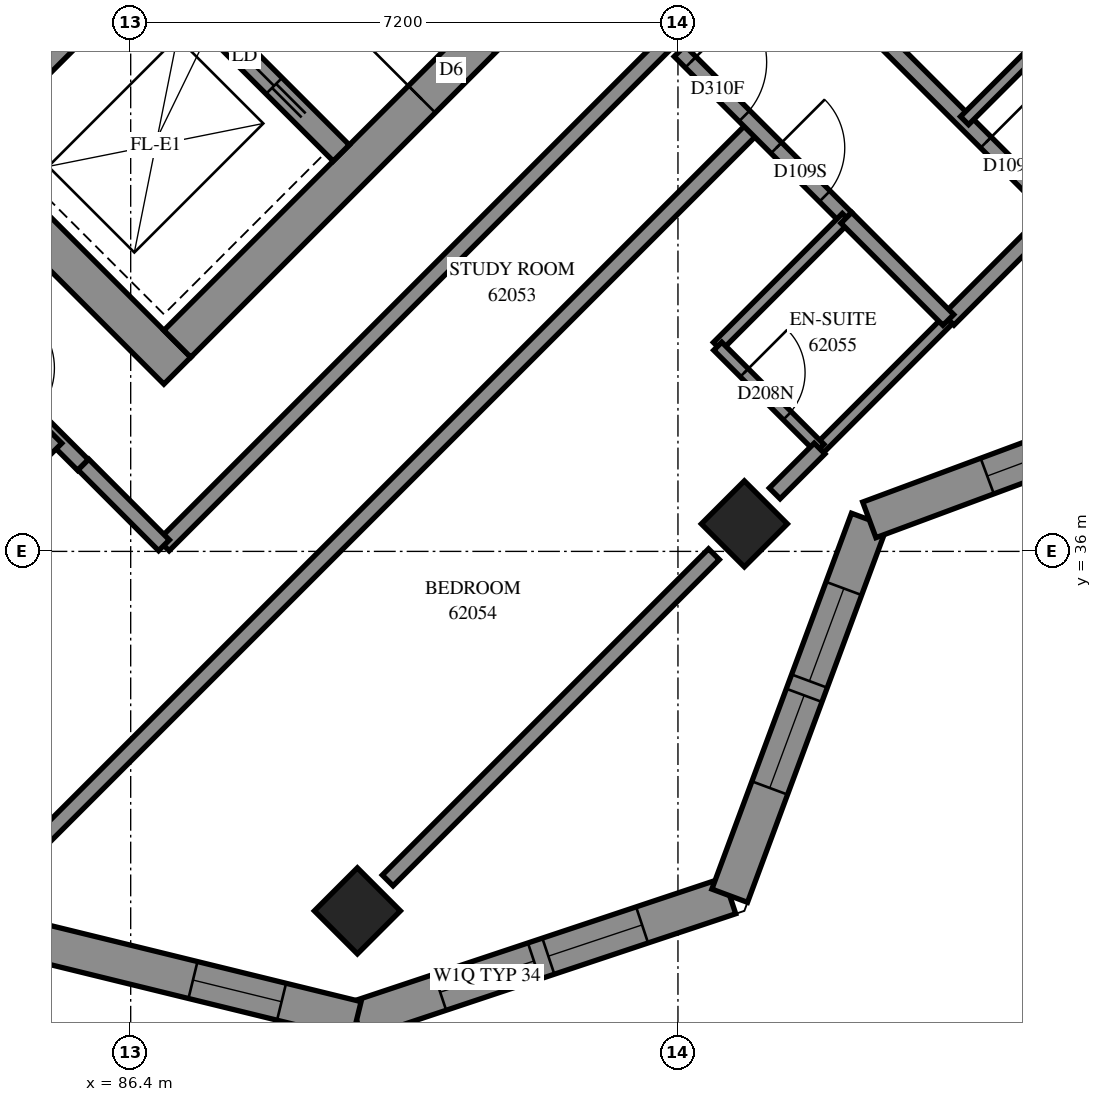
"""IFC4 building model, lengths in metres.
Left out: names, types, materials, properties, quantities, classifications, styles, units other than length and angle.
Written with IfcOpenShell. Run it as: python <this file> out.ifc"""

import sys

from ifc_helpers import new_model, si_unit, direction, frame, frame_2d, origin, origin_2d, place, context, subcontext, project, spatial, polyline, rectangle, outline, extrude, element, fill, save


model = new_model("IFC4")
c1 = context("Model", 3, precision=1e-05, world=origin(), true_north=direction((0.0, 1.0)))
c2 = subcontext(c1, "Body", "Model", "MODEL_VIEW")
j1 = project(units=[si_unit("LENGTHUNIT", "METRE"), si_unit("PLANEANGLEUNIT", "RADIAN")], contexts=[c1])
p1 = place(None, origin())
s1 = spatial("IfcSite", under=j1, at=p1, CompositionType="ELEMENT")
p2 = place(p1, origin())
s2 = spatial("IfcBuilding", under=s1, at=p2, CompositionType="ELEMENT")
p3 = place(p2, frame((0.0, 0.0, 227.0)))
s3 = spatial("IfcBuildingStorey", under=s2, at=p3, CompositionType="ELEMENT", Elevation=227.0)
for number, where, z_axis, x_axis in (
    (1, (94.474, 36.362, 0.0), (0.0, 0.0, 1.0), (0.707, -0.707, 0.0)),
    (2, (89.382, 31.271, 0.0), (0.0, 0.0, 1.0), (0.707, -0.707, 0.0)),
):
    element("IfcColumn", number, at=place(p3, frame(where, z_axis=z_axis, x_axis=x_axis)), inside=s3, PredefinedType="COLUMN", context=c2, shape_type="SweptSolid", body=[
        extrude(rectangle(XDim=0.8, YDim=0.8, at=origin_2d()), origin(), (0.0, 0.0, 1.0), 3.1),
    ])
p4 = place(p3, frame((76.124, 49.267, -0.3), z_axis=(0.0, 0.0, 1.0), x_axis=(0.7071067812, -0.7071067812, 0.0)))
e3 = element("IfcWall", 3, at=p4, inside=s3, PredefinedType="SHEAR", context=c2, shape_type="SweptSolid", body=[
    extrude(rectangle(XDim=15.4, YDim=0.5, at=frame_2d((7.7, 0.0))), origin(), (0.0, 0.0, 1.0), 2.7),
])
p5 = place(p3, frame((87.013, 38.731, -0.3), z_axis=(0.0, 0.0, 1.0), x_axis=(0.7071067812, 0.7071067812, 0.0)))
e4 = element("IfcWall", 4, at=p5, inside=s3, PredefinedType="SHEAR", context=c2, shape_type="SweptSolid", body=[
    extrude(rectangle(XDim=14.4, YDim=0.5, at=frame_2d((7.2, 0.0))), origin(), (0.0, 0.0, 1.0), 2.7),
])
p6 = place(p5, frame((4.55, 0.0, 0.3)))
e5 = element("IfcOpeningElement", 5, at=p6, cuts=e4, PredefinedType="OPENING", context=c2, shape_type="SweptSolid", body=[
    extrude(rectangle(XDim=1.1, YDim=2.1, at=frame_2d((0.55, 1.05))), frame((0.0, 0.26, 0.0), z_axis=(0.0, -1.0, 0.0), x_axis=(1.0, 0.0, 0.0)), (0.0, 0.0, 1.0), 0.52),
])
p7 = place(p5, frame((11.35, 0.0, 0.3)))
e6 = element("IfcOpeningElement", 6, at=p7, cuts=e4, PredefinedType="OPENING", context=c2, shape_type="SweptSolid", body=[
    extrude(rectangle(XDim=1.1, YDim=2.1, at=frame_2d((0.55, 1.05))), frame((0.0, 0.26, 0.0), z_axis=(0.0, -1.0, 0.0), x_axis=(1.0, 0.0, 0.0)), (0.0, 0.0, 1.0), 0.52),
])
p8 = place(p3, frame((84.291, 41.453, 0.0), z_axis=(0.0, 0.0, 1.0), x_axis=(0.7071067812, 0.7071067812, 0.0)))
e7 = element("IfcWall", 7, at=p8, inside=s3, PredefinedType="SOLIDWALL", context=c2, shape_type="SweptSolid", body=[
    extrude(rectangle(XDim=3.3, YDim=0.3, at=frame_2d((1.65, 0.0))), origin(), (0.0, 0.0, 1.0), 3.1),
])
p9 = place(p3, frame((78.988, 51.423, 0.0), z_axis=(0.0, 0.0, 1.0), x_axis=(0.7071067812, -0.7071067812, 0.0)))
e8 = element("IfcWall", 8, at=p9, inside=s3, PredefinedType="SOLIDWALL", context=c2, shape_type="SweptSolid", body=[
    extrude(rectangle(XDim=14.4, YDim=0.3, at=frame_2d((7.2, 0.0))), origin(), (0.0, 0.0, 1.0), 3.1),
])
p10 = place(p9, frame((1.35, 0.0, 0.0)))
e9 = element("IfcOpeningElement", 9, at=p10, cuts=e8, PredefinedType="OPENING", context=c2, shape_type="SweptSolid", body=[
    extrude(rectangle(XDim=0.9, YDim=2.1, at=frame_2d((0.45, 1.05))), frame((0.0, 0.16, 0.0), z_axis=(0.0, -1.0, 0.0), x_axis=(1.0, 0.0, 0.0)), (0.0, 0.0, 1.0), 0.32),
])
p11 = place(p9, frame((4.95, 0.0, 0.0)))
e10 = element("IfcOpeningElement", 10, at=p11, cuts=e8, PredefinedType="OPENING", context=c2, shape_type="SweptSolid", body=[
    extrude(rectangle(XDim=0.9, YDim=2.1, at=frame_2d((0.45, 1.05))), frame((0.0, 0.16, 0.0), z_axis=(0.0, -1.0, 0.0), x_axis=(1.0, 0.0, 0.0)), (0.0, 0.0, 1.0), 0.32),
])
p12 = place(p9, frame((8.55, 0.0, 0.0)))
e11 = element("IfcOpeningElement", 11, at=p12, cuts=e8, PredefinedType="OPENING", context=c2, shape_type="SweptSolid", body=[
    extrude(rectangle(XDim=0.9, YDim=2.1, at=frame_2d((0.45, 1.05))), frame((0.0, 0.16, 0.0), z_axis=(0.0, -1.0, 0.0), x_axis=(1.0, 0.0, 0.0)), (0.0, 0.0, 1.0), 0.32),
])
p13 = place(p9, frame((12.05, 0.0, 0.0)))
e12 = element("IfcOpeningElement", 12, at=p13, cuts=e8, PredefinedType="OPENING", context=c2, shape_type="SweptSolid", body=[
    extrude(rectangle(XDim=1.1, YDim=2.1, at=frame_2d((0.55, 1.05))), frame((0.0, 0.16, 0.0), z_axis=(0.0, -1.0, 0.0), x_axis=(1.0, 0.0, 0.0)), (0.0, 0.0, 1.0), 0.32),
])
p14 = place(p3, frame((89.372, 29.834, 0.0), z_axis=(0.0, 0.0, 1.0), x_axis=(0.948687163, 0.3162161709, 0.0)))
e13 = element("IfcWall", 13, at=p14, inside=s3, PredefinedType="SOLIDWALL", context=c2, shape_type="SweptSolid", body=[
    extrude(outline(polyline([(-0.072, -0.25), (5.294, -0.25), (5.055, 0.25), (0.072, 0.25), (-0.072, -0.25)])), origin(), (0.0, 0.0, 1.0), 3.1),
])
p15 = place(p14, frame((1.16, 0.0, 0.45)))
e14 = element("IfcOpeningElement", 14, at=p15, cuts=e13, PredefinedType="OPENING", context=c2, shape_type="SweptSolid", body=[
    extrude(rectangle(XDim=1.3, YDim=2.5, at=frame_2d((0.65, 1.25))), frame((0.0, 0.26, 0.0), z_axis=(0.0, -1.0, 0.0), x_axis=(1.0, 0.0, 0.0)), (0.0, 0.0, 1.0), 0.52),
])
p16 = place(p14, frame((2.66, 0.0, 0.45)))
e15 = element("IfcOpeningElement", 15, at=p16, cuts=e13, PredefinedType="OPENING", context=c2, shape_type="SweptSolid", body=[
    extrude(rectangle(XDim=1.3, YDim=2.5, at=frame_2d((0.65, 1.25))), frame((0.0, 0.26, 0.0), z_axis=(0.0, -1.0, 0.0), x_axis=(1.0, 0.0, 0.0)), (0.0, 0.0, 1.0), 0.52),
])
p17 = place(p3, frame((94.281, 31.47, 0.0), z_axis=(0.0, 0.0, 1.0), x_axis=(0.3481903374, 0.9374238577, 0.0)))
e16 = element("IfcWall", 16, at=p17, inside=s3, PredefinedType="SOLIDWALL", context=c2, shape_type="SweptSolid", body=[
    extrude(outline(polyline([(-0.12, -0.25), (5.16, -0.25), (5.39, 0.25), (0.12, 0.25), (-0.12, -0.25)])), origin(), (0.0, 0.0, 1.0), 3.1),
])
p18 = place(p17, frame((1.512, 0.0, 0.45)))
e17 = element("IfcOpeningElement", 17, at=p18, cuts=e16, PredefinedType="OPENING", context=c2, shape_type="SweptSolid", body=[
    extrude(rectangle(XDim=1.3, YDim=2.5, at=frame_2d((0.65, 1.25))), frame((0.0, 0.26, 0.0), z_axis=(0.0, -1.0, 0.0), x_axis=(1.0, 0.0, 0.0)), (0.0, 0.0, 1.0), 0.52),
])
p19 = place(p17, frame((3.012, 0.0, 0.45)))
e18 = element("IfcOpeningElement", 18, at=p19, cuts=e16, PredefinedType="OPENING", context=c2, shape_type="SweptSolid", body=[
    extrude(rectangle(XDim=1.3, YDim=2.5, at=frame_2d((0.65, 1.25))), frame((0.0, 0.26, 0.0), z_axis=(0.0, -1.0, 0.0), x_axis=(1.0, 0.0, 0.0)), (0.0, 0.0, 1.0), 0.52),
])
p20 = place(p3, frame((96.118, 36.415, 0.0), z_axis=(0.0, 0.0, 1.0), x_axis=(0.9374238577, 0.3481903374, 0.0)))
e19 = element("IfcWall", 19, at=p20, inside=s3, PredefinedType="SOLIDWALL", context=c2, shape_type="SweptSolid", body=[
    extrude(outline(polyline([(0.115, -0.25), (5.395, -0.25), (5.155, 0.25), (-0.115, 0.25), (0.115, -0.25)])), origin(), (0.0, 0.0, 1.0), 3.1),
])
p21 = place(p20, frame((1.655, 0.0, 0.45)))
e20 = element("IfcOpeningElement", 20, at=p21, cuts=e19, PredefinedType="OPENING", context=c2, shape_type="SweptSolid", body=[
    extrude(rectangle(XDim=1.3, YDim=2.5, at=frame_2d((0.65, 1.25))), frame((0.0, 0.26, 0.0), z_axis=(0.0, -1.0, 0.0), x_axis=(1.0, 0.0, 0.0)), (0.0, 0.0, 1.0), 0.52),
])
p22 = place(p20, frame((3.155, 0.0, 0.45)))
e21 = element("IfcOpeningElement", 21, at=p22, cuts=e19, PredefinedType="OPENING", context=c2, shape_type="SweptSolid", body=[
    extrude(rectangle(XDim=1.3, YDim=2.5, at=frame_2d((0.65, 1.25))), frame((0.0, 0.26, 0.0), z_axis=(0.0, -1.0, 0.0), x_axis=(1.0, 0.0, 0.0)), (0.0, 0.0, 1.0), 0.52),
])
p23 = place(p3, frame((85.087, 30.883, 0.0), z_axis=(0.0, 0.0, 1.0), x_axis=(0.9712772119, -0.2379507881, 0.0)))
e22 = element("IfcWall", 22, at=p23, inside=s3, PredefinedType="SOLIDWALL", context=c2, shape_type="SweptSolid", body=[
    extrude(outline(polyline([(-0.145, -0.25), (4.483, -0.25), (4.339, 0.25), (0.145, 0.25), (-0.145, -0.25)])), origin(), (0.0, 0.0, 1.0), 3.1),
])
p24 = place(p23, frame((2.195, 0.0, 0.45)))
e23 = element("IfcOpeningElement", 23, at=p24, cuts=e22, PredefinedType="OPENING", context=c2, shape_type="SweptSolid", body=[
    extrude(rectangle(XDim=1.2, YDim=2.5, at=frame_2d((0.6, 1.25))), frame((0.0, 0.26, 0.0), z_axis=(0.0, -1.0, 0.0), x_axis=(1.0, 0.0, 0.0)), (0.0, 0.0, 1.0), 0.52),
])
p25 = place(p3, frame((85.026, 32.008, 0.0), z_axis=(0.0, 0.0, 1.0), x_axis=(0.7071030933, 0.707110469, 0.0)))
e24 = element("IfcWall", 24, at=p25, inside=s3, PredefinedType="PARTITIONING", context=c2, shape_type="SweptSolid", body=[
    extrude(rectangle(XDim=13.558, YDim=0.2, at=frame_2d((6.779, 0.0))), origin(), (0.0, 0.0, 1.0), 3.1),
])
p26 = place(p3, frame((86.835, 36.079, 0.0), z_axis=(0.0, 0.0, 1.0), x_axis=(0.7071067812, 0.7071067812, 0.0)))
e25 = element("IfcWall", 25, at=p26, inside=s3, PredefinedType="PARTITIONING", context=c2, shape_type="SweptSolid", body=[
    extrude(rectangle(XDim=9.402, YDim=0.2, at=frame_2d((4.701, 0.0))), origin(), (0.0, 0.0, 1.0), 3.1),
])
p27 = place(p3, frame((80.849, 42.061, 0.0), z_axis=(0.0, 0.0, 1.0), x_axis=(0.7071067812, -0.7071067812, 0.0)))
e26 = element("IfcWall", 26, at=p27, inside=s3, PredefinedType="PARTITIONING", context=c2, shape_type="SweptSolid", body=[
    extrude(rectangle(XDim=6.964, YDim=0.2, at=frame_2d((3.482, 0.0))), origin(), (0.0, 0.0, 1.0), 3.1),
])
p28 = place(p27, frame((5.159, 0.0, 0.0)))
e27 = element("IfcOpeningElement", 27, at=p28, cuts=e26, PredefinedType="OPENING", context=c2, shape_type="SweptSolid", body=[
    extrude(rectangle(XDim=0.9, YDim=2.1, at=frame_2d((0.45, 1.05))), frame((0.0, 0.11, 0.0), z_axis=(0.0, -1.0, 0.0), x_axis=(1.0, 0.0, 0.0)), (0.0, 0.0, 1.0), 0.22),
])
p29 = place(p3, frame((89.781, 31.671, 0.0), z_axis=(0.0, 0.0, 1.0), x_axis=(0.7071067812, 0.7071067812, 0.0)))
e28 = element("IfcWall", 28, at=p29, inside=s3, PredefinedType="PARTITIONING", context=c2, shape_type="SweptSolid", body=[
    extrude(rectangle(XDim=6.07, YDim=0.2, at=frame_2d((3.035, 0.0))), origin(), (0.0, 0.0, 1.0), 2.6),
])
p30 = place(p3, frame((94.895, 44.137, 0.0), z_axis=(0.0, 0.0, 1.0), x_axis=(0.7071067812, -0.7071067812, 0.0)))
e29 = element("IfcWall", 29, at=p30, inside=s3, PredefinedType="PARTITIONING", context=c2, shape_type="SweptSolid", body=[
    extrude(rectangle(XDim=5.199, YDim=0.2, at=frame_2d((2.599, 0.0))), origin(), (0.0, 0.0, 1.0), 3.1),
])
p31 = place(p30, frame((3.898, 0.0, 0.0)))
e30 = element("IfcOpeningElement", 30, at=p31, cuts=e29, PredefinedType="OPENING", context=c2, shape_type="SweptSolid", body=[
    extrude(rectangle(XDim=0.9, YDim=2.1, at=frame_2d((0.45, 1.05))), frame((0.0, 0.11, 0.0), z_axis=(0.0, -1.0, 0.0), x_axis=(1.0, 0.0, 0.0)), (0.0, 0.0, 1.0), 0.22),
])
p32 = place(p3, frame((93.621, 42.581, 0.0), z_axis=(0.0, 0.0, 1.0), x_axis=(0.7071067812, -0.7071067812, 0.0)))
e31 = element("IfcWall", 31, at=p32, inside=s3, PredefinedType="PARTITIONING", context=c2, shape_type="SweptSolid", body=[
    extrude(rectangle(XDim=3.1, YDim=0.2, at=frame_2d((1.55, 0.0))), origin(), (0.0, 0.0, 1.0), 3.1),
])
p33 = place(p32, frame((0.206, 0.0, 0.0)))
e32 = element("IfcOpeningElement", 32, at=p33, cuts=e31, PredefinedType="OPENING", context=c2, shape_type="SweptSolid", body=[
    extrude(rectangle(XDim=1.0, YDim=2.1, at=frame_2d((0.5, 1.05))), frame((0.0, 0.11, 0.0), z_axis=(0.0, -1.0, 0.0), x_axis=(1.0, 0.0, 0.0)), (0.0, 0.0, 1.0), 0.22),
])
p34 = place(p32, frame((1.8, 0.0, 0.0)))
e33 = element("IfcOpeningElement", 33, at=p34, cuts=e31, PredefinedType="OPENING", context=c2, shape_type="SweptSolid", body=[
    extrude(rectangle(XDim=0.9, YDim=2.1, at=frame_2d((0.45, 1.05))), frame((0.0, 0.11, 0.0), z_axis=(0.0, -1.0, 0.0), x_axis=(1.0, 0.0, 0.0)), (0.0, 0.0, 1.0), 0.22),
])
p35 = place(p3, frame((97.371, 41.667, 0.0), z_axis=(0.0, 0.0, 1.0), x_axis=(0.7075233388, 0.706689978, 0.0)))
e34 = element("IfcWall", 34, at=p35, inside=s3, PredefinedType="PARTITIONING", context=c2, shape_type="SweptSolid", body=[
    extrude(rectangle(XDim=2.4, YDim=0.15, at=frame_2d((1.2, 0.0))), origin(), (0.0, 0.0, 1.0), 3.1),
])
p36 = place(p3, frame((94.12, 38.697, 0.0), z_axis=(0.0, 0.0, 1.0), x_axis=(0.7071067812, 0.7071067812, 0.0)))
e35 = element("IfcWall", 35, at=p36, inside=s3, PredefinedType="PARTITIONING", context=c2, shape_type="SweptSolid", body=[
    extrude(rectangle(XDim=2.398, YDim=0.15, at=frame_2d((1.199, 0.0))), origin(), (0.0, 0.0, 1.0), 3.1),
])
p37 = place(p3, frame((95.463, 37.353, 0.0), z_axis=(0.0, 0.0, 1.0), x_axis=(0.7071067812, 0.7071067812, 0.0)))
e36 = element("IfcWall", 36, at=p37, inside=s3, PredefinedType="PARTITIONING", context=c2, shape_type="SweptSolid", body=[
    extrude(rectangle(XDim=2.398, YDim=0.15, at=frame_2d((1.199, 0.0))), origin(), (0.0, 0.0, 1.0), 2.6),
])
p38 = place(p3, frame((97.16, 39.048, 0.0), z_axis=(0.0, 0.0, 1.0), x_axis=(0.7066068826, 0.7076063266, 0.0)))
e37 = element("IfcWall", 37, at=p38, inside=s3, PredefinedType="PARTITIONING", context=c2, shape_type="SweptSolid", body=[
    extrude(rectangle(XDim=2.001, YDim=0.2, at=frame_2d((1.001, 0.0))), origin(), (0.0, 0.0, 1.0), 2.6),
])
p39 = place(p3, frame((94.124, 38.7, 0.0), z_axis=(0.0, 0.0, 1.0), x_axis=(0.7071067812, -0.7071067812, 0.0)))
e38 = element("IfcWall", 38, at=p39, inside=s3, PredefinedType="PARTITIONING", context=c2, shape_type="SweptSolid", body=[
    extrude(rectangle(XDim=1.901, YDim=0.15, at=frame_2d((0.95, 0.0))), origin(), (0.0, 0.0, 1.0), 3.1),
])
p40 = place(p39, frame((0.494, 0.0, 0.0)))
e39 = element("IfcOpeningElement", 39, at=p40, cuts=e38, PredefinedType="OPENING", context=c2, shape_type="SweptSolid", body=[
    extrude(rectangle(XDim=0.8, YDim=2.1, at=frame_2d((0.4, 1.05))), frame((0.0, 0.085, 0.0), z_axis=(0.0, -1.0, 0.0), x_axis=(1.0, 0.0, 0.0)), (0.0, 0.0, 1.0), 0.17),
])
p41 = place(p3, frame((95.815, 40.389, 0.0), z_axis=(0.0, 0.0, 1.0), x_axis=(0.7065800724, -0.7076330979, 0.0)))
e40 = element("IfcWall", 40, at=p41, inside=s3, PredefinedType="PARTITIONING", context=c2, shape_type="SweptSolid", body=[
    extrude(rectangle(XDim=1.899, YDim=0.2, at=frame_2d((0.95, 0.0))), origin(), (0.0, 0.0, 1.0), 3.1),
])
p42 = place(p3, frame((85.778, 37.142, 0.0), z_axis=(0.0, 0.0, 1.0), x_axis=(0.7064400143, -0.70777292, 0.0)))
e41 = element("IfcWall", 41, at=p42, inside=s3, PredefinedType="PARTITIONING", context=c2, shape_type="SweptSolid", body=[
    extrude(rectangle(XDim=1.5, YDim=0.2, at=frame_2d((0.75, 0.0))), origin(), (0.0, 0.0, 1.0), 3.1),
])
p43 = place(p3, frame((84.693, 36.761, 0.0), z_axis=(0.0, 0.0, 1.0), x_axis=(0.7061388061, 0.708073433, 0.0)))
e42 = element("IfcWall", 42, at=p43, inside=s3, PredefinedType="PARTITIONING", context=c2, shape_type="SweptSolid", body=[
    extrude(rectangle(XDim=1.034, YDim=0.2, at=frame_2d((0.517, 0.0))), origin(), (0.0, 0.0, 1.0), 3.1),
])
p44 = place(p3, frame((94.873, 36.763, 0.0), z_axis=(0.0, 0.0, 1.0), x_axis=(0.7071067812, 0.7071067812, 0.0)))
e43 = element("IfcWall", 43, at=p44, inside=s3, PredefinedType="PARTITIONING", context=c2, shape_type="SweptSolid", body=[
    extrude(rectangle(XDim=0.834, YDim=0.2, at=frame_2d((0.417, 0.0))), origin(), (0.0, 0.0, 1.0), 2.6),
])
p45 = place(p15, origin())
e44 = element("IfcWindow", 44, at=p45, inside=s3, PartitioningType="SINGLE_PANEL", PredefinedType="WINDOW", context=c2, shape_type="SweptSolid", body=[
    extrude(rectangle(XDim=1.3, YDim=2.5, at=frame_2d((0.65, 1.25))), frame((0.0, 0.18, 0.0), z_axis=(0.0, -1.0, 0.0), x_axis=(1.0, 0.0, 0.0)), (0.0, 0.0, 1.0), 0.06),
])
fill(e14, e44)
p46 = place(p16, origin())
e45 = element("IfcWindow", 45, at=p46, inside=s3, PartitioningType="SINGLE_PANEL", PredefinedType="WINDOW", context=c2, shape_type="SweptSolid", body=[
    extrude(rectangle(XDim=1.3, YDim=2.5, at=frame_2d((0.65, 1.25))), frame((0.0, 0.18, 0.0), z_axis=(0.0, -1.0, 0.0), x_axis=(1.0, 0.0, 0.0)), (0.0, 0.0, 1.0), 0.06),
])
fill(e15, e45)
p47 = place(p18, origin())
e46 = element("IfcWindow", 46, at=p47, inside=s3, PartitioningType="SINGLE_PANEL", PredefinedType="WINDOW", context=c2, shape_type="SweptSolid", body=[
    extrude(rectangle(XDim=1.3, YDim=2.5, at=frame_2d((0.65, 1.25))), frame((0.0, 0.18, 0.0), z_axis=(0.0, -1.0, 0.0), x_axis=(1.0, 0.0, 0.0)), (0.0, 0.0, 1.0), 0.06),
])
fill(e17, e46)
p48 = place(p19, origin())
e47 = element("IfcWindow", 47, at=p48, inside=s3, PartitioningType="SINGLE_PANEL", PredefinedType="WINDOW", context=c2, shape_type="SweptSolid", body=[
    extrude(rectangle(XDim=1.3, YDim=2.5, at=frame_2d((0.65, 1.25))), frame((0.0, 0.18, 0.0), z_axis=(0.0, -1.0, 0.0), x_axis=(1.0, 0.0, 0.0)), (0.0, 0.0, 1.0), 0.06),
])
fill(e18, e47)
p49 = place(p21, origin())
e48 = element("IfcWindow", 48, at=p49, inside=s3, PartitioningType="SINGLE_PANEL", PredefinedType="WINDOW", context=c2, shape_type="SweptSolid", body=[
    extrude(rectangle(XDim=1.3, YDim=2.5, at=frame_2d((0.65, 1.25))), frame((0.0, 0.18, 0.0), z_axis=(0.0, -1.0, 0.0), x_axis=(1.0, 0.0, 0.0)), (0.0, 0.0, 1.0), 0.06),
])
fill(e20, e48)
p50 = place(p24, origin())
e49 = element("IfcWindow", 49, at=p50, inside=s3, PartitioningType="SINGLE_PANEL", PredefinedType="WINDOW", context=c2, shape_type="SweptSolid", body=[
    extrude(rectangle(XDim=1.2, YDim=2.5, at=frame_2d((0.6, 1.25))), frame((0.0, 0.18, 0.0), z_axis=(0.0, -1.0, 0.0), x_axis=(1.0, 0.0, 0.0)), (0.0, 0.0, 1.0), 0.06),
])
fill(e23, e49)
p51 = place(p6, origin())
e50 = element("IfcDoor", 50, at=p51, inside=s3, OperationType="DOUBLE_DOOR_SINGLE_SWING", PredefinedType="DOOR", context=c2, shape_type="SweptSolid", body=[
    extrude(rectangle(XDim=1.1, YDim=2.1, at=frame_2d((0.55, 1.05))), frame((0.0, 0.025, 0.0), z_axis=(0.0, -1.0, 0.0), x_axis=(1.0, 0.0, 0.0)), (0.0, 0.0, 1.0), 0.05),
])
fill(e5, e50)
p52 = place(p13, origin())
e51 = element("IfcDoor", 51, at=p52, inside=s3, OperationType="SLIDING_TO_RIGHT", PredefinedType="DOOR", context=c2, shape_type="SweptSolid", body=[
    extrude(rectangle(XDim=1.1, YDim=2.1, at=frame_2d((0.55, 1.05))), frame((0.0, 0.025, 0.0), z_axis=(0.0, -1.0, 0.0), x_axis=(1.0, 0.0, 0.0)), (0.0, 0.0, 1.0), 0.05),
])
fill(e12, e51)
p53 = place(p33, origin())
e52 = element("IfcDoor", 52, at=p53, inside=s3, OperationType="SINGLE_SWING_RIGHT", PredefinedType="DOOR", context=c2, shape_type="SweptSolid", body=[
    extrude(rectangle(XDim=1.0, YDim=2.1, at=frame_2d((0.5, 1.05))), frame((0.0, 0.025, 0.0), z_axis=(0.0, -1.0, 0.0), x_axis=(1.0, 0.0, 0.0)), (0.0, 0.0, 1.0), 0.05),
])
fill(e32, e52)
p54 = place(p34, origin())
e53 = element("IfcDoor", 53, at=p54, inside=s3, OperationType="SINGLE_SWING_LEFT", PredefinedType="DOOR", context=c2, shape_type="SweptSolid", body=[
    extrude(rectangle(XDim=0.9, YDim=2.1, at=frame_2d((0.45, 1.05))), frame((0.0, 0.025, 0.0), z_axis=(0.0, -1.0, 0.0), x_axis=(1.0, 0.0, 0.0)), (0.0, 0.0, 1.0), 0.05),
])
fill(e33, e53)
p55 = place(p40, origin())
e54 = element("IfcDoor", 54, at=p55, inside=s3, OperationType="SINGLE_SWING_RIGHT", PredefinedType="DOOR", context=c2, shape_type="SweptSolid", body=[
    extrude(rectangle(XDim=0.8, YDim=2.1, at=frame_2d((0.4, 1.05))), frame((0.0, 0.025, 0.0), z_axis=(0.0, -1.0, 0.0), x_axis=(1.0, 0.0, 0.0)), (0.0, 0.0, 1.0), 0.05),
])
fill(e39, e54)
p56 = place(p31, origin())
e55 = element("IfcDoor", 55, at=p56, inside=s3, OperationType="SINGLE_SWING_RIGHT", PredefinedType="DOOR", context=c2, shape_type="SweptSolid", body=[
    extrude(rectangle(XDim=0.9, YDim=2.1, at=frame_2d((0.45, 1.05))), frame((0.0, 0.025, 0.0), z_axis=(0.0, -1.0, 0.0), x_axis=(1.0, 0.0, 0.0)), (0.0, 0.0, 1.0), 0.05),
])
fill(e30, e55)
save(model, sys.argv[1])
